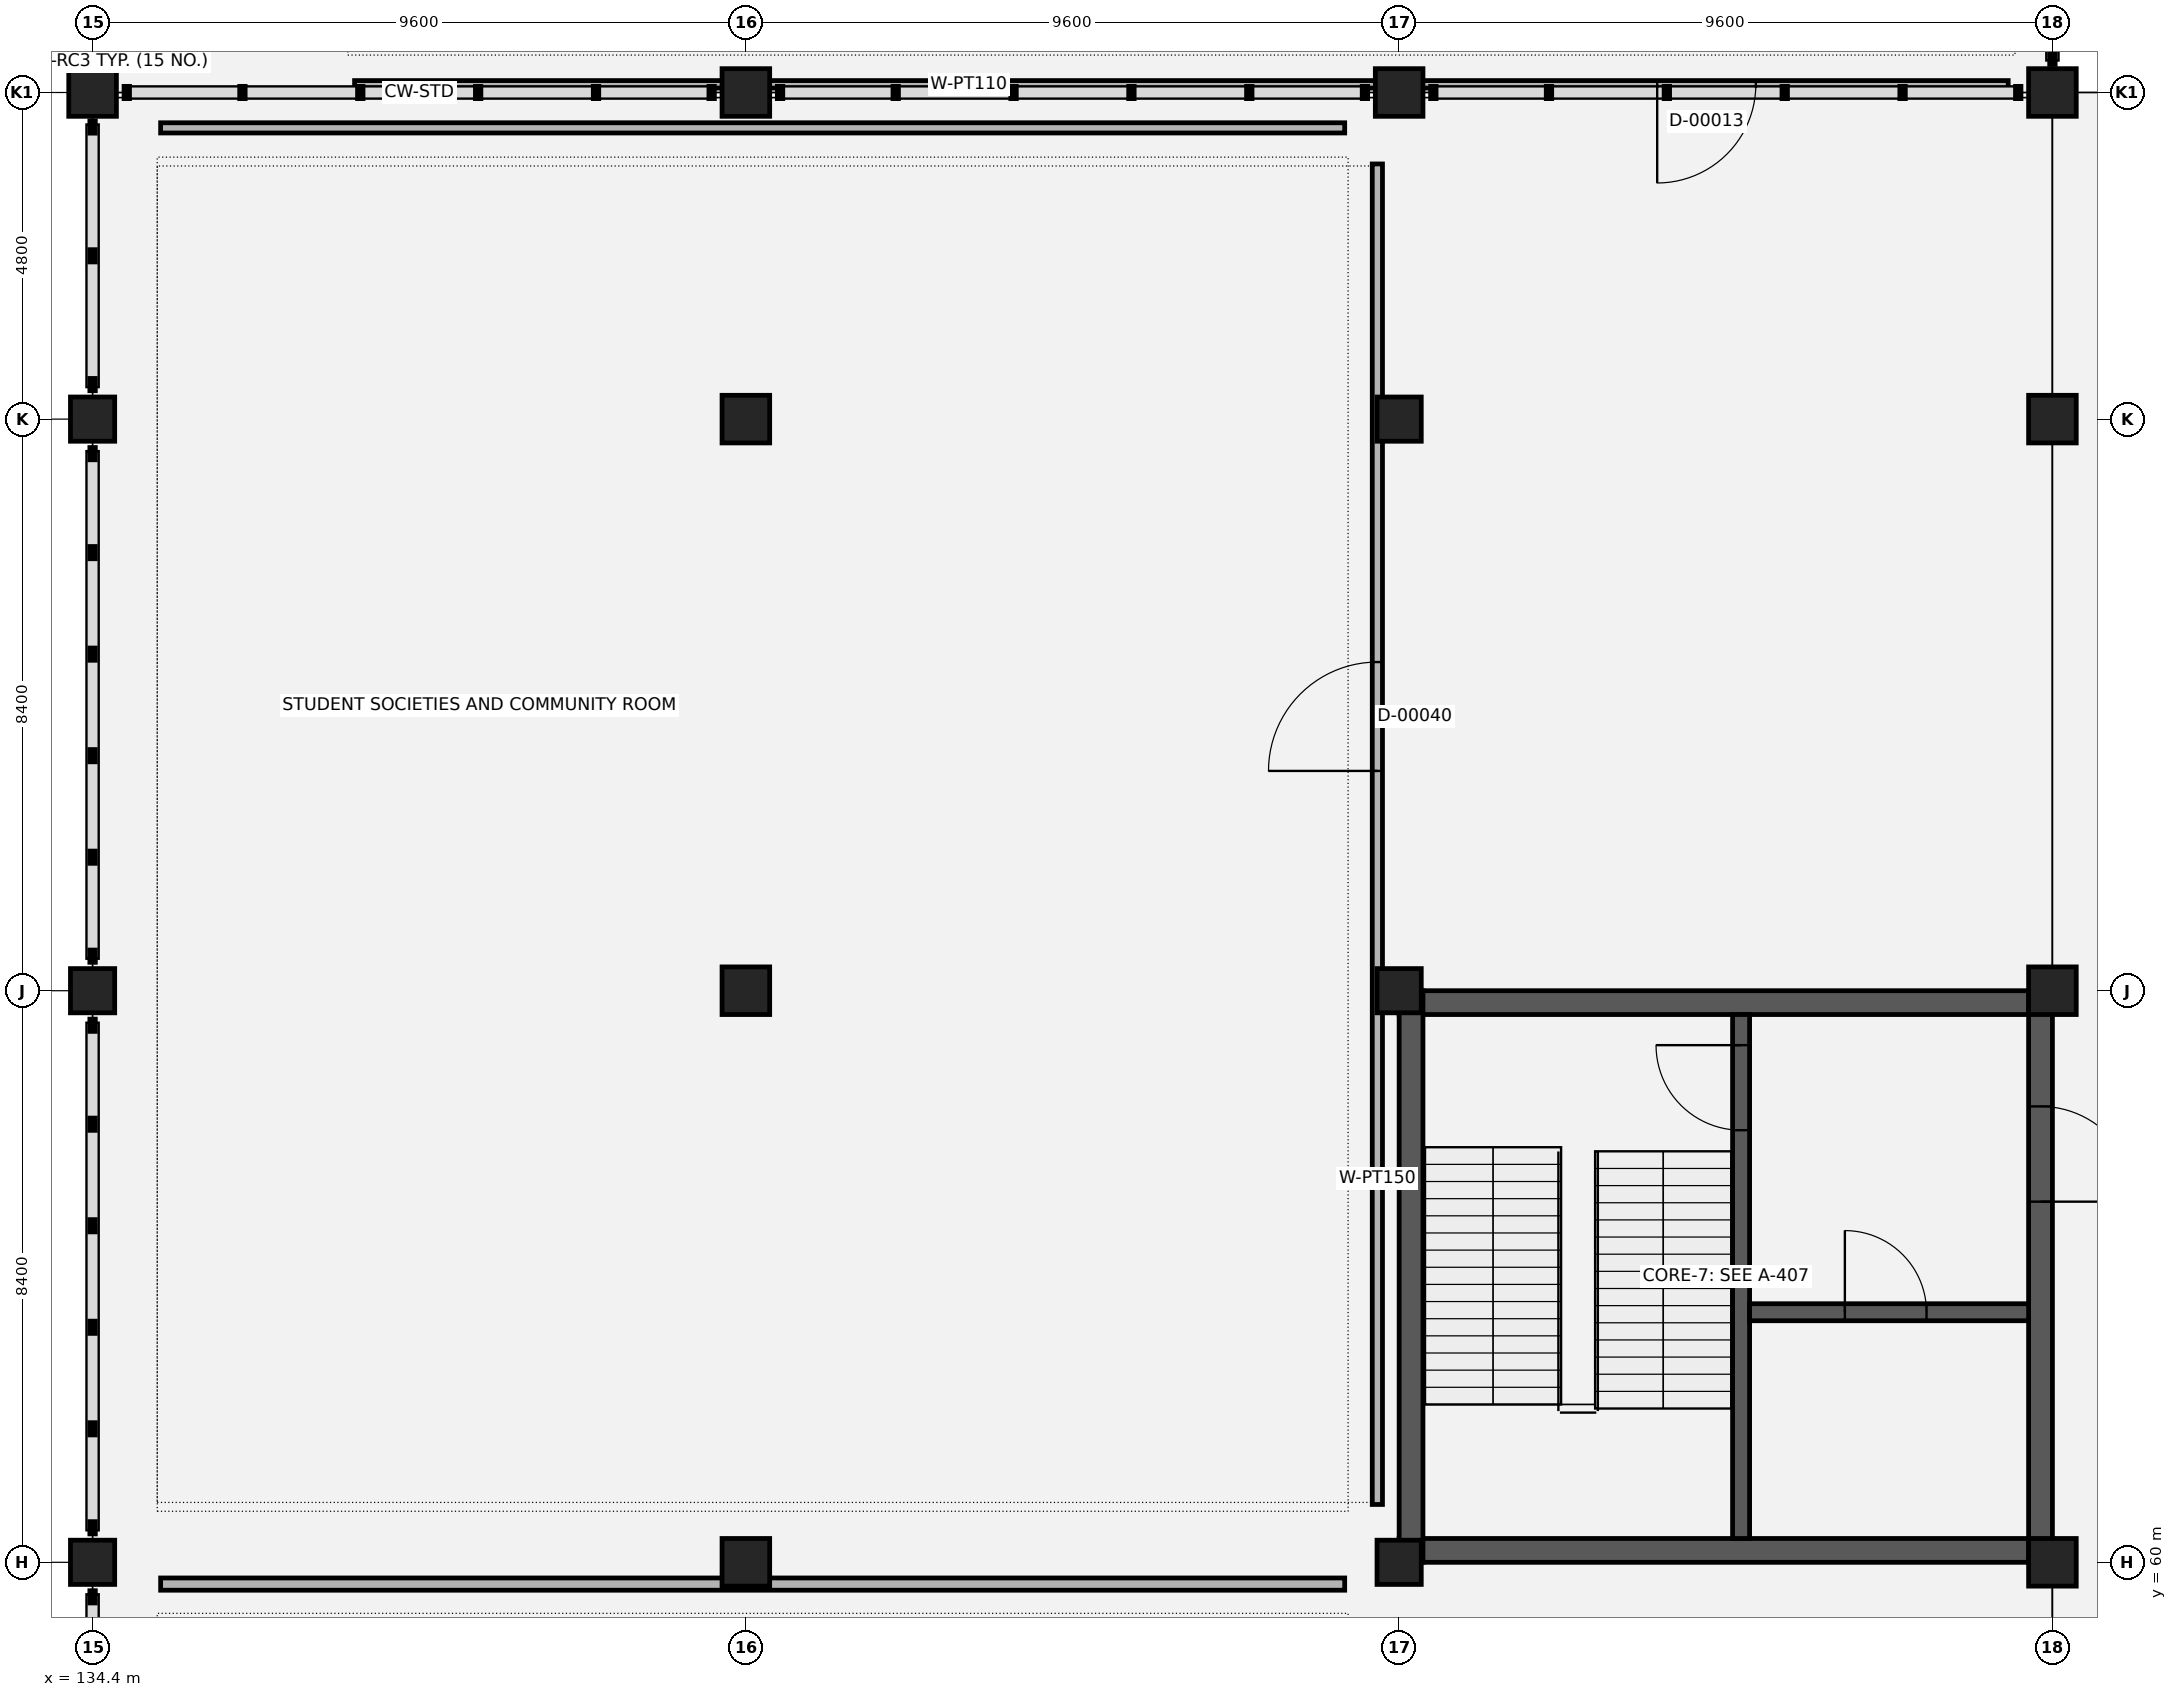
"""IFC4 building model, lengths in metres.
Left out: names, types, materials, properties, quantities, classifications, styles, units other than length and angle.
Written with IfcOpenShell. Run it as: python <this file> out.ifc"""

import sys

from ifc_helpers import new_model, si_unit, direction, frame, frame_2d, origin, origin_2d, place, context, subcontext, project, spatial, rectangle, extrude, element, fill, save


model = new_model("IFC4")
c1 = context("Model", 3, precision=1e-05, world=origin(), true_north=direction((0.0, 1.0)))
c2 = subcontext(c1, "Body", "Model", "MODEL_VIEW")
j1 = project(units=[si_unit("LENGTHUNIT", "METRE"), si_unit("PLANEANGLEUNIT", "RADIAN")], contexts=[c1])
p1 = place(None, origin())
s1 = spatial("IfcSite", under=j1, at=p1, CompositionType="ELEMENT")
p2 = place(p1, origin())
s2 = spatial("IfcBuilding", under=s1, at=p2, CompositionType="ELEMENT")
p3 = place(p2, origin())
s3 = spatial("IfcBuildingStorey", under=s2, at=p3, CompositionType="ELEMENT", Elevation=0.0)
for number, where, z_axis, x_axis in (
    (1, (134.4, 60.0, 0.0), (0.0, 0.0, 1.0), (1.0, 0.0, 0.0)),
    (2, (134.4, 68.4, 0.0), (0.0, 0.0, 1.0), (1.0, 0.0, 0.0)),
    (3, (134.4, 76.8, 0.0), (0.0, 0.0, 1.0), (1.0, 0.0, 0.0)),
):
    element("IfcColumn", number, at=place(p3, frame(where, z_axis=z_axis, x_axis=x_axis)), inside=s3, PredefinedType="COLUMN", context=c2, shape_type="SweptSolid", body=[
        extrude(rectangle(XDim=0.65, YDim=0.65, at=origin_2d()), origin(), (0.0, 0.0, 1.0), 5.4),
    ])
for number, where, z_axis, x_axis in (
    (4, (134.4, 81.6, 0.0), (0.0, 0.0, 1.0), (1.0, 0.0, 0.0)),
    (5, (144.0, 60.0, 0.0), (0.0, 0.0, 1.0), (1.0, 0.0, 0.0)),
    (6, (144.0, 68.4, 0.0), (0.0, 0.0, 1.0), (1.0, 0.0, 0.0)),
    (7, (144.0, 76.8, 0.0), (0.0, 0.0, 1.0), (1.0, 0.0, 0.0)),
    (8, (144.0, 81.6, 0.0), (0.0, 0.0, 1.0), (1.0, 0.0, 0.0)),
):
    element("IfcColumn", number, at=place(p3, frame(where, z_axis=z_axis, x_axis=x_axis)), inside=s3, PredefinedType="COLUMN", context=c2, shape_type="SweptSolid", body=[
        extrude(rectangle(XDim=0.7, YDim=0.7, at=origin_2d()), origin(), (0.0, 0.0, 1.0), 5.4),
    ])
for number, where, z_axis, x_axis in (
    (9, (153.6, 60.0, 0.0), (0.0, 0.0, 1.0), (1.0, 0.0, 0.0)),
    (10, (153.6, 68.4, 0.0), (0.0, 0.0, 1.0), (1.0, 0.0, 0.0)),
    (11, (153.6, 76.8, 0.0), (0.0, 0.0, 1.0), (1.0, 0.0, 0.0)),
):
    element("IfcColumn", number, at=place(p3, frame(where, z_axis=z_axis, x_axis=x_axis)), inside=s3, PredefinedType="COLUMN", context=c2, shape_type="SweptSolid", body=[
        extrude(rectangle(XDim=0.65, YDim=0.65, at=origin_2d()), origin(), (0.0, 0.0, 1.0), 5.4),
    ])
for number, where, z_axis, x_axis in (
    (12, (153.6, 81.6, 0.0), (0.0, 0.0, 1.0), (1.0, 0.0, 0.0)),
    (13, (163.2, 60.0, 0.0), (0.0, 0.0, 1.0), (1.0, 0.0, 0.0)),
    (14, (163.2, 68.4, 0.0), (0.0, 0.0, 1.0), (1.0, 0.0, 0.0)),
    (15, (163.2, 76.8, 0.0), (0.0, 0.0, 1.0), (1.0, 0.0, 0.0)),
    (16, (163.2, 81.6, 0.0), (0.0, 0.0, 1.0), (1.0, 0.0, 0.0)),
):
    element("IfcColumn", number, at=place(p3, frame(where, z_axis=z_axis, x_axis=x_axis)), inside=s3, PredefinedType="COLUMN", context=c2, shape_type="SweptSolid", body=[
        extrude(rectangle(XDim=0.7, YDim=0.7, at=origin_2d()), origin(), (0.0, 0.0, 1.0), 5.4),
    ])
for number, where, z_axis, x_axis in (
    (17, (153.6, 68.225, 0.0), (0.0, 0.0, 1.0), (1.0, 0.0, 0.0)),
    (18, (153.6, 60.175, 0.0), (0.0, 0.0, 1.0), (1.0, 0.0, 0.0)),
):
    element("IfcWall", number, at=place(p3, frame(where, z_axis=z_axis, x_axis=x_axis)), inside=s3, PredefinedType="SHEAR", context=c2, shape_type="SweptSolid", body=[
        extrude(rectangle(XDim=9.6, YDim=0.35, at=frame_2d((4.8, 0.0))), origin(), (0.0, 0.0, 1.0), 5.11),
    ])
p4 = place(p3, frame((153.775, 60.0, 0.0), z_axis=(0.0, 0.0, 1.0), x_axis=(0.0, 1.0, 0.0)))
e19 = element("IfcWall", 19, at=p4, inside=s3, PredefinedType="SHEAR", context=c2, shape_type="SweptSolid", body=[
    extrude(rectangle(XDim=8.4, YDim=0.35, at=frame_2d((4.2, 0.0))), origin(), (0.0, 0.0, 1.0), 5.11),
])
p5 = place(p3, frame((163.025, 60.0, 0.0), z_axis=(0.0, 0.0, 1.0), x_axis=(0.0, 1.0, 0.0)))
e20 = element("IfcWall", 20, at=p5, inside=s3, PredefinedType="SHEAR", context=c2, shape_type="SweptSolid", body=[
    extrude(rectangle(XDim=8.4, YDim=0.35, at=frame_2d((4.2, 0.0))), origin(), (0.0, 0.0, 1.0), 5.11),
])
p6 = place(p5, frame((5.3, 0.0, 0.0)))
e21 = element("IfcOpeningElement", 21, at=p6, cuts=e20, PredefinedType="OPENING", context=c2, shape_type="SweptSolid", body=[
    extrude(rectangle(XDim=1.4, YDim=2.15, at=frame_2d((0.7, 1.075))), frame((0.0, 0.185, 0.0), z_axis=(0.0, -1.0, 0.0), x_axis=(1.0, 0.0, 0.0)), (0.0, 0.0, 1.0), 0.37),
])
p7 = place(p3, frame((158.625, 68.05, 0.0), z_axis=(0.0, 0.0, 1.0), x_axis=(0.0, -1.0, 0.0)))
e22 = element("IfcWall", 22, at=p7, inside=s3, PredefinedType="SHEAR", context=c2, shape_type="SweptSolid", body=[
    extrude(rectangle(XDim=7.7, YDim=0.25, at=frame_2d((3.85, 0.0))), origin(), (0.0, 0.0, 1.0), 5.11),
])
p8 = place(p7, frame((0.45, 0.0, 0.0)))
e23 = element("IfcOpeningElement", 23, at=p8, cuts=e22, PredefinedType="OPENING", context=c2, shape_type="SweptSolid", body=[
    extrude(rectangle(XDim=1.25, YDim=2.15, at=frame_2d((0.625, 1.075))), frame((0.0, 0.135, 0.0), z_axis=(0.0, -1.0, 0.0), x_axis=(1.0, 0.0, 0.0)), (0.0, 0.0, 1.0), 0.27),
])
p9 = place(p3, frame((158.75, 63.675, 0.0), z_axis=(0.0, 0.0, 1.0), x_axis=(1.0, 0.0, 0.0)))
e24 = element("IfcWall", 24, at=p9, inside=s3, PredefinedType="SHEAR", context=c2, shape_type="SweptSolid", body=[
    extrude(rectangle(XDim=4.1, YDim=0.25, at=frame_2d((2.05, 0.0))), origin(), (0.0, 0.0, 1.0), 5.11),
])
p10 = place(p9, frame((1.4, 0.0, 0.0)))
e25 = element("IfcOpeningElement", 25, at=p10, cuts=e24, PredefinedType="OPENING", context=c2, shape_type="SweptSolid", body=[
    extrude(rectangle(XDim=1.2, YDim=2.15, at=frame_2d((0.6, 1.075))), frame((0.0, 0.135, 0.0), z_axis=(0.0, -1.0, 0.0), x_axis=(1.0, 0.0, 0.0)), (0.0, 0.0, 1.0), 0.27),
])
p11 = place(p3, frame((138.25, 81.72, 0.0), z_axis=(0.0, 0.0, 1.0), x_axis=(1.0, 0.0, 0.0)))
e26 = element("IfcWall", 26, at=p11, inside=s3, PredefinedType="PARTITIONING", context=c2, shape_type="SweptSolid", body=[
    extrude(rectangle(XDim=24.3, YDim=0.11, at=frame_2d((12.15, 0.0))), origin(), (0.0, 0.0, 1.0), 4.04),
])
p12 = place(p11, frame((19.142, 0.0, 0.0)))
e27 = element("IfcOpeningElement", 27, at=p12, cuts=e26, PredefinedType="OPENING", context=c2, shape_type="SweptSolid", body=[
    extrude(rectangle(XDim=1.45, YDim=2.15, at=frame_2d((0.725, 1.075))), frame((0.0, 0.065, 0.0), z_axis=(0.0, -1.0, 0.0), x_axis=(1.0, 0.0, 0.0)), (0.0, 0.0, 1.0), 0.13),
])
p13 = place(p3, frame((135.4, 59.68, 0.0), z_axis=(0.0, 0.0, 1.0), x_axis=(1.0, 0.0, 0.0)))
e28 = element("IfcWall", 28, at=p13, inside=s3, PredefinedType="PARTITIONING", context=c2, shape_type="SweptSolid", body=[
    extrude(rectangle(XDim=17.4, YDim=0.18, at=frame_2d((8.7, 0.0))), origin(), (0.0, 0.0, 1.0), 4.04),
])
p14 = place(p3, frame((153.28, 60.85, 0.0), z_axis=(0.0, 0.0, 1.0), x_axis=(0.0, 1.0, 0.0)))
e29 = element("IfcWall", 29, at=p14, inside=s3, PredefinedType="PARTITIONING", context=c2, shape_type="SweptSolid", body=[
    extrude(rectangle(XDim=19.7, YDim=0.15, at=frame_2d((9.85, 0.0))), origin(), (0.0, 0.0, 1.0), 4.04),
])
p15 = place(p14, frame((10.78, 0.0, 0.0)))
e30 = element("IfcOpeningElement", 30, at=p15, cuts=e29, PredefinedType="OPENING", context=c2, shape_type="SweptSolid", body=[
    extrude(rectangle(XDim=1.6, YDim=2.15, at=frame_2d((0.8, 1.075))), frame((0.0, 0.085, 0.0), z_axis=(0.0, -1.0, 0.0), x_axis=(1.0, 0.0, 0.0)), (0.0, 0.0, 1.0), 0.17),
])
p16 = place(p3, frame((135.4, 81.08, 0.0), z_axis=(0.0, 0.0, 1.0), x_axis=(1.0, 0.0, 0.0)))
e31 = element("IfcWall", 31, at=p16, inside=s3, PredefinedType="PARTITIONING", context=c2, shape_type="SweptSolid", body=[
    extrude(rectangle(XDim=17.4, YDim=0.15, at=frame_2d((8.7, 0.0))), origin(), (0.0, 0.0, 1.0), 4.04),
])
p17 = place(p8, origin())
e32 = element("IfcDoor", 32, at=p17, inside=s3, OperationType="SINGLE_SWING_RIGHT", PredefinedType="DOOR", context=c2, shape_type="SweptSolid", body=[
    extrude(rectangle(XDim=1.25, YDim=2.15, at=frame_2d((0.625, 1.075))), frame((0.0, 0.025, 0.0), z_axis=(0.0, -1.0, 0.0), x_axis=(1.0, 0.0, 0.0)), (0.0, 0.0, 1.0), 0.05),
])
fill(e23, e32)
p18 = place(p10, origin())
e33 = element("IfcDoor", 33, at=p18, inside=s3, OperationType="SINGLE_SWING_LEFT", PredefinedType="DOOR", context=c2, shape_type="SweptSolid", body=[
    extrude(rectangle(XDim=1.2, YDim=2.15, at=frame_2d((0.6, 1.075))), frame((0.0, 0.025, 0.0), z_axis=(0.0, -1.0, 0.0), x_axis=(1.0, 0.0, 0.0)), (0.0, 0.0, 1.0), 0.05),
])
fill(e25, e33)
p19 = place(p6, origin())
e34 = element("IfcDoor", 34, at=p19, inside=s3, OperationType="SINGLE_SWING_RIGHT", PredefinedType="DOOR", context=c2, shape_type="SweptSolid", body=[
    extrude(rectangle(XDim=1.4, YDim=2.15, at=frame_2d((0.7, 1.075))), frame((0.0, 0.025, 0.0), z_axis=(0.0, -1.0, 0.0), x_axis=(1.0, 0.0, 0.0)), (0.0, 0.0, 1.0), 0.05),
])
fill(e21, e34)
p20 = place(p12, origin())
e35 = element("IfcDoor", 35, at=p20, inside=s3, OperationType="SINGLE_SWING_RIGHT", PredefinedType="DOOR", context=c2, shape_type="SweptSolid", body=[
    extrude(rectangle(XDim=1.45, YDim=2.15, at=frame_2d((0.725, 1.075))), frame((0.0, 0.025, 0.0), z_axis=(0.0, -1.0, 0.0), x_axis=(1.0, 0.0, 0.0)), (0.0, 0.0, 1.0), 0.05),
])
fill(e27, e35)
p21 = place(p15, origin())
e36 = element("IfcDoor", 36, at=p21, inside=s3, OperationType="SINGLE_SWING_LEFT", PredefinedType="DOOR", context=c2, shape_type="SweptSolid", body=[
    extrude(rectangle(XDim=1.6, YDim=2.15, at=frame_2d((0.8, 1.075))), frame((0.0, 0.025, 0.0), z_axis=(0.0, -1.0, 0.0), x_axis=(1.0, 0.0, 0.0)), (0.0, 0.0, 1.0), 0.05),
])
fill(e30, e36)
save(model, sys.argv[1])
